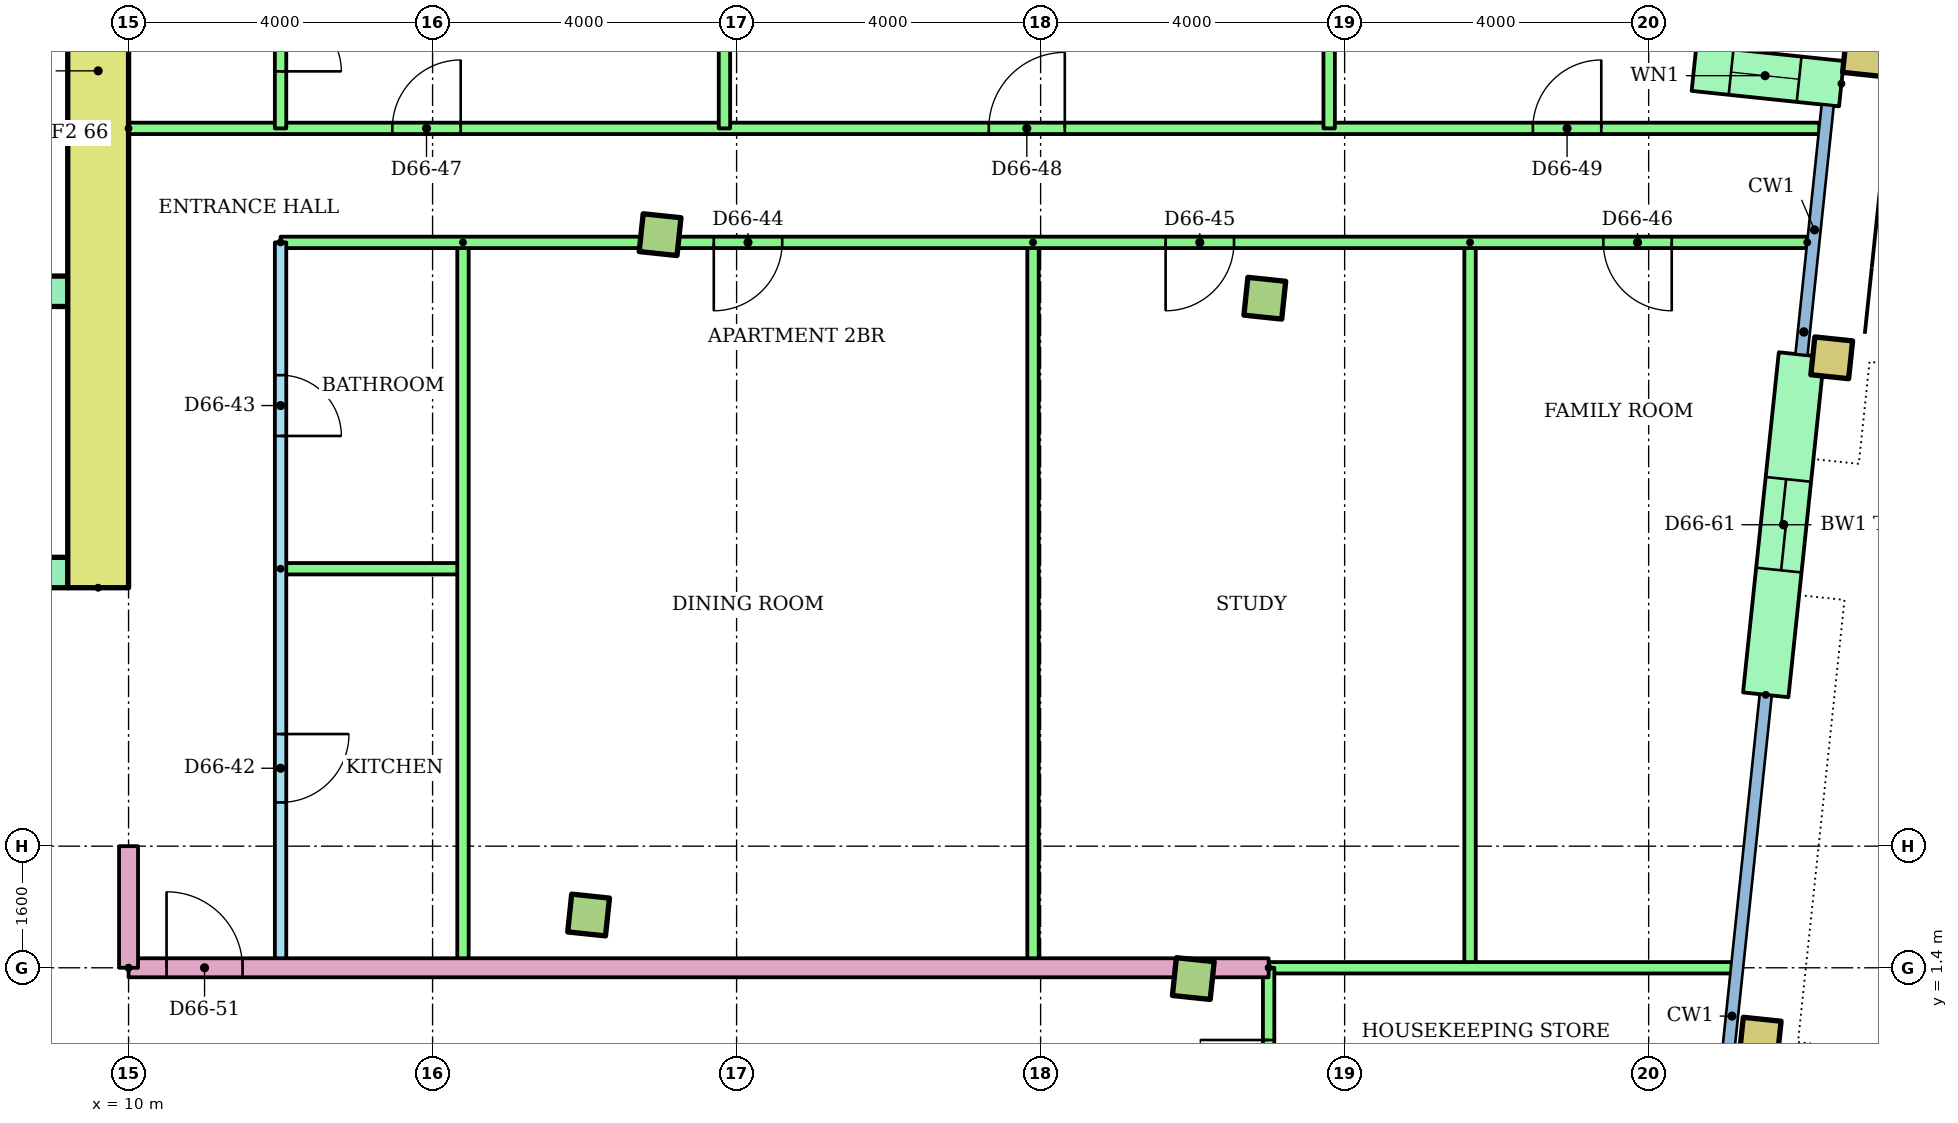
"""IFC4 building model, lengths in metres.
Left out: names, types, materials, properties, quantities, classifications, styles, units other than length and angle.
Written with IfcOpenShell. Run it as: python <this file> out.ifc"""

import sys

from ifc_helpers import new_model, si_unit, direction, frame, frame_2d, origin, origin_2d, place, context, subcontext, project, spatial, rectangle, hollow_rectangle, extrude, element, fill, save


model = new_model("IFC4")
c1 = context("Model", 3, precision=1e-05, world=origin(), true_north=direction((0.0, 1.0)))
c2 = subcontext(c1, "Body", "Model", "MODEL_VIEW")
j1 = project(units=[si_unit("LENGTHUNIT", "METRE"), si_unit("PLANEANGLEUNIT", "RADIAN")], contexts=[c1])
p1 = place(None, origin())
s1 = spatial("IfcSite", under=j1, at=p1, CompositionType="ELEMENT")
p2 = place(p1, origin())
s2 = spatial("IfcBuilding", under=s1, at=p2, CompositionType="ELEMENT")
p3 = place(p2, frame((0.0, 0.0, 256.3)))
s3 = spatial("IfcBuildingStorey", under=s2, at=p3, CompositionType="ELEMENT", Elevation=256.3)
for number, where, z_axis, x_axis in (
    (1, (16.053, 2.094, 0.0), (0.0, 0.0, 1.0), (0.995, -0.105, 0.0)),
    (2, (24.009, 1.258, 0.0), (0.0, 0.0, 1.0), (0.995, -0.105, 0.0)),
):
    element("IfcColumn", number, at=place(p3, frame(where, z_axis=z_axis, x_axis=x_axis)), inside=s3, PredefinedType="COLUMN", context=c2, shape_type="SweptSolid", body=[
        extrude(rectangle(XDim=0.5, YDim=0.5, at=origin_2d()), origin(), (0.0, 0.0, 1.0), 3.2),
    ])
p4 = place(p3, frame((31.468, 0.474, 0.0), z_axis=(0.0, 0.0, 1.0), x_axis=(0.994521895368, -0.104528463268, 0.0)))
e3 = element("IfcColumn", 3, at=p4, inside=s3, PredefinedType="COLUMN", context=c2, shape_type="SweptSolid", body=[
    extrude(hollow_rectangle(XDim=0.5, YDim=0.5, WallThickness=0.025, at=origin_2d()), origin(), (0.0, 0.0, 1.0), 3.2),
])
for number, where, z_axis, x_axis in (
    (4, (16.993, 11.045, 0.0), (0.0, 0.0, 1.0), (0.995, -0.105, 0.0)),
    (5, (24.95, 10.209, 0.0), (0.0, 0.0, 1.0), (0.995, -0.105, 0.0)),
):
    element("IfcColumn", number, at=place(p3, frame(where, z_axis=z_axis, x_axis=x_axis)), inside=s3, PredefinedType="COLUMN", context=c2, shape_type="SweptSolid", body=[
        extrude(rectangle(XDim=0.5, YDim=0.5, at=origin_2d()), origin(), (0.0, 0.0, 1.0), 3.2),
    ])
for number, where, z_axis, x_axis in (
    (6, (32.409, 9.425, 0.0), (0.0, 0.0, 1.0), (0.995, -0.105, 0.0)),
    (7, (32.827, 13.403, 0.0), (0.0, 0.0, 1.0), (0.995, -0.105, 0.0)),
):
    element("IfcColumn", number, at=place(p3, frame(where, z_axis=z_axis, x_axis=x_axis)), inside=s3, PredefinedType="COLUMN", context=c2, shape_type="SweptSolid", body=[
        extrude(hollow_rectangle(XDim=0.5, YDim=0.5, WallThickness=0.025, at=origin_2d()), origin(), (0.0, 0.0, 1.0), 3.2),
    ])
p5 = place(p3, frame((32.536, 13.031, 0.0), z_axis=(0.0, 0.0, 1.0), x_axis=(-0.994534226826, 0.104411070641, 0.0)))
e8 = element("IfcWall", 8, at=p5, inside=s3, PredefinedType="STANDARD", context=c2, shape_type="SweptSolid", body=[
    extrude(rectangle(XDim=1.95, YDim=0.6, at=frame_2d((0.975, 0.0))), origin(), (0.0, 0.0, 1.0), 2.92),
])
p6 = place(p5, frame((0.56, 0.0, 0.9)))
e9 = element("IfcOpeningElement", 9, at=p6, cuts=e8, PredefinedType="OPENING", context=c2, shape_type="SweptSolid", body=[
    extrude(rectangle(XDim=0.9, YDim=1.5, at=frame_2d((0.45, 0.75))), frame((0.0, 0.31, 0.0), z_axis=(0.0, -1.0, 0.0), x_axis=(1.0, 0.0, 0.0)), (0.0, 0.0, 1.0), 0.62),
])
p7 = place(p3, frame((31.54, 4.991, 0.0), z_axis=(0.0, 0.0, 1.0), x_axis=(0.104546400045, 0.994520009974, 0.0)))
e10 = element("IfcWall", 10, at=p7, inside=s3, PredefinedType="STANDARD", context=c2, shape_type="SweptSolid", body=[
    extrude(rectangle(XDim=4.5, YDim=0.6, at=frame_2d((2.25, 0.0))), origin(), (0.0, 0.0, 1.0), 2.92),
])
p8 = place(p7, frame((1.65, 0.0, 0.0)))
e11 = element("IfcOpeningElement", 11, at=p8, cuts=e10, PredefinedType="OPENING", context=c2, shape_type="SweptSolid", body=[
    extrude(rectangle(XDim=1.2, YDim=2.1, at=frame_2d((0.6, 1.05))), frame((0.0, 0.31, 0.0), z_axis=(0.0, -1.0, 0.0), x_axis=(1.0, 0.0, 0.0)), (0.0, 0.0, 1.0), 0.62),
])
p9 = place(p3, frame((9.6, 6.4, 0.0), z_axis=(0.0, 0.0, 1.0), x_axis=(0.0, 1.0, 0.0)))
e12 = element("IfcWall", 12, at=p9, inside=s3, PredefinedType="SHEAR", context=c2, shape_type="SweptSolid", body=[
    extrude(rectangle(XDim=13.6, YDim=0.8, at=frame_2d((6.8, 0.0))), origin(), (0.0, 0.0, 1.0), 2.92),
])
p10 = place(p3, frame((-9.2, 6.6, 0.0)))
e13 = element("IfcWall", 13, at=p10, inside=s3, PredefinedType="SHEAR", context=c2, shape_type="SweptSolid", body=[
    extrude(rectangle(XDim=18.4, YDim=0.4, at=frame_2d((9.2, 0.0))), origin(), (0.0, 0.0, 1.0), 2.92),
])
p11 = place(p10, frame((8.3, 0.0, 0.0)))
e14 = element("IfcOpeningElement", 14, at=p11, cuts=e13, PredefinedType="OPENING", context=c2, shape_type="SweptSolid", body=[
    extrude(rectangle(XDim=1.8, YDim=2.1, at=frame_2d((0.9, 1.05))), frame((0.0, 0.21, 0.0), z_axis=(0.0, -1.0, 0.0), x_axis=(1.0, 0.0, 0.0)), (0.0, 0.0, 1.0), 0.42),
])
p12 = place(p10, frame((3.8, 0.0, 0.0)))
e15 = element("IfcOpeningElement", 15, at=p12, cuts=e13, PredefinedType="OPENING", context=c2, shape_type="SweptSolid", body=[
    extrude(rectangle(XDim=1.8, YDim=2.1, at=frame_2d((0.9, 1.05))), frame((0.0, 0.21, 0.0), z_axis=(0.0, -1.0, 0.0), x_axis=(1.0, 0.0, 0.0)), (0.0, 0.0, 1.0), 0.42),
])
p13 = place(p10, frame((12.8, 0.0, 0.0)))
e16 = element("IfcOpeningElement", 16, at=p13, cuts=e13, PredefinedType="OPENING", context=c2, shape_type="SweptSolid", body=[
    extrude(rectangle(XDim=1.8, YDim=2.1, at=frame_2d((0.9, 1.05))), frame((0.0, 0.21, 0.0), z_axis=(0.0, -1.0, 0.0), x_axis=(1.0, 0.0, 0.0)), (0.0, 0.0, 1.0), 0.42),
])
p14 = place(p3, frame((1.2, 10.3, 0.0)))
e17 = element("IfcWall", 17, at=p14, inside=s3, PredefinedType="SHEAR", context=c2, shape_type="SweptSolid", body=[
    extrude(rectangle(XDim=8.0, YDim=0.4, at=frame_2d((4.0, 0.0))), origin(), (0.0, 0.0, 1.0), 2.92),
])
p15 = place(p14, frame((0.817, 0.0, 0.0)))
e18 = element("IfcOpeningElement", 18, at=p15, cuts=e17, PredefinedType="OPENING", context=c2, shape_type="SweptSolid", body=[
    extrude(rectangle(XDim=1.1, YDim=2.1, at=frame_2d((0.55, 1.05))), frame((0.0, 0.21, 0.0), z_axis=(0.0, -1.0, 0.0), x_axis=(1.0, 0.0, 0.0)), (0.0, 0.0, 1.0), 0.42),
])
p16 = place(p14, frame((3.55, 0.0, 0.0)))
e19 = element("IfcOpeningElement", 19, at=p16, cuts=e17, PredefinedType="OPENING", context=c2, shape_type="SweptSolid", body=[
    extrude(rectangle(XDim=1.1, YDim=2.1, at=frame_2d((0.55, 1.05))), frame((0.0, 0.21, 0.0), z_axis=(0.0, -1.0, 0.0), x_axis=(1.0, 0.0, 0.0)), (0.0, 0.0, 1.0), 0.42),
])
p17 = place(p14, frame((6.283, 0.0, 0.0)))
e20 = element("IfcOpeningElement", 20, at=p17, cuts=e17, PredefinedType="OPENING", context=c2, shape_type="SweptSolid", body=[
    extrude(rectangle(XDim=1.1, YDim=2.1, at=frame_2d((0.55, 1.05))), frame((0.0, 0.21, 0.0), z_axis=(0.0, -1.0, 0.0), x_axis=(1.0, 0.0, 0.0)), (0.0, 0.0, 1.0), 0.42),
])
p18 = place(p3, frame((12.0, 10.943, 0.0), z_axis=(0.0, 0.0, 1.0), x_axis=(0.0, -1.0, 0.0)))
e21 = element("IfcWall", 21, at=p18, inside=s3, PredefinedType="PARTITIONING", context=c2, shape_type="SweptSolid", body=[
    extrude(rectangle(XDim=9.543, YDim=0.15, at=frame_2d((4.772, 0.0))), origin(), (0.0, 0.0, 1.0), 2.4),
])
p19 = place(p18, frame((6.469, 0.0, 0.0)))
e22 = element("IfcOpeningElement", 22, at=p19, cuts=e21, PredefinedType="OPENING", context=c2, shape_type="SweptSolid", body=[
    extrude(rectangle(XDim=0.9, YDim=2.1, at=frame_2d((0.45, 1.05))), frame((0.0, 0.085, 0.0), z_axis=(0.0, -1.0, 0.0), x_axis=(1.0, 0.0, 0.0)), (0.0, 0.0, 1.0), 0.17),
])
p20 = place(p18, frame((1.747, 0.0, 0.0)))
e23 = element("IfcOpeningElement", 23, at=p20, cuts=e21, PredefinedType="OPENING", context=c2, shape_type="SweptSolid", body=[
    extrude(rectangle(XDim=0.8, YDim=2.1, at=frame_2d((0.4, 1.05))), frame((0.0, 0.085, 0.0), z_axis=(0.0, -1.0, 0.0), x_axis=(1.0, 0.0, 0.0)), (0.0, 0.0, 1.0), 0.17),
])
p21 = place(p3, frame((12.0, 6.65, 0.0)))
e24 = element("IfcWall", 24, at=p21, inside=s3, PredefinedType="PARTITIONING", context=c2, shape_type="SweptSolid", body=[
    extrude(rectangle(XDim=2.4, YDim=0.15, at=frame_2d((1.2, 0.0))), origin(), (0.0, 0.0, 1.0), 2.4),
])
for number, where, z_axis, x_axis in (
    (25, (14.4, 10.943, 0.0), (0.0, 0.0, 1.0), (0.0, -1.0, 0.0)),
    (26, (21.9, 10.943, 0.0), (0.0, 0.0, 1.0), (0.0, -1.0, 0.0)),
    (27, (27.65, 10.943, 0.0), (0.0, 0.0, 1.0), (0.0, -1.0, 0.0)),
):
    element("IfcWall", number, at=place(p3, frame(where, z_axis=z_axis, x_axis=x_axis)), inside=s3, PredefinedType="PARTITIONING", context=c2, shape_type="SweptSolid", body=[
        extrude(rectangle(XDim=9.543, YDim=0.15, at=frame_2d((4.772, 0.0))), origin(), (0.0, 0.0, 1.0), 2.4),
    ])
p22 = place(p3, frame((32.087, 10.943, 0.0), z_axis=(0.0, 0.0, 1.0), x_axis=(-1.0, 0.0, 0.0)))
e28 = element("IfcWall", 28, at=p22, inside=s3, PredefinedType="PARTITIONING", context=c2, shape_type="SweptSolid", body=[
    extrude(rectangle(XDim=20.087, YDim=0.15, at=frame_2d((10.043, 0.0))), origin(), (0.0, 0.0, 1.0), 2.4),
])
p23 = place(p22, frame((13.487, 0.0, 0.0)))
e29 = element("IfcOpeningElement", 29, at=p23, cuts=e28, PredefinedType="OPENING", context=c2, shape_type="SweptSolid", body=[
    extrude(rectangle(XDim=0.9, YDim=2.1, at=frame_2d((0.45, 1.05))), frame((0.0, 0.085, 0.0), z_axis=(0.0, -1.0, 0.0), x_axis=(1.0, 0.0, 0.0)), (0.0, 0.0, 1.0), 0.17),
])
p24 = place(p22, frame((7.542, 0.0, 0.0)))
e30 = element("IfcOpeningElement", 30, at=p24, cuts=e28, PredefinedType="OPENING", context=c2, shape_type="SweptSolid", body=[
    extrude(rectangle(XDim=0.9, YDim=2.1, at=frame_2d((0.45, 1.05))), frame((0.0, 0.085, 0.0), z_axis=(0.0, -1.0, 0.0), x_axis=(1.0, 0.0, 0.0)), (0.0, 0.0, 1.0), 0.17),
])
p25 = place(p22, frame((1.783, 0.0, 0.0)))
e31 = element("IfcOpeningElement", 31, at=p25, cuts=e28, PredefinedType="OPENING", context=c2, shape_type="SweptSolid", body=[
    extrude(rectangle(XDim=0.9, YDim=2.1, at=frame_2d((0.45, 1.05))), frame((0.0, 0.085, 0.0), z_axis=(0.0, -1.0, 0.0), x_axis=(1.0, 0.0, 0.0)), (0.0, 0.0, 1.0), 0.17),
])
p26 = place(p3, frame((10.0, 12.443, 0.0)))
e32 = element("IfcWall", 32, at=p26, inside=s3, PredefinedType="PARTITIONING", context=c2, shape_type="SweptSolid", body=[
    extrude(rectangle(XDim=22.244, YDim=0.15, at=frame_2d((11.122, 0.0))), origin(), (0.0, 0.0, 1.0), 2.4),
])
p27 = place(p26, frame((3.47, 0.0, 0.0)))
e33 = element("IfcOpeningElement", 33, at=p27, cuts=e32, PredefinedType="OPENING", context=c2, shape_type="SweptSolid", body=[
    extrude(rectangle(XDim=0.9, YDim=2.1, at=frame_2d((0.45, 1.05))), frame((0.0, 0.085, 0.0), z_axis=(0.0, -1.0, 0.0), x_axis=(1.0, 0.0, 0.0)), (0.0, 0.0, 1.0), 0.17),
])
p28 = place(p26, frame((11.318, 0.0, 0.0)))
e34 = element("IfcOpeningElement", 34, at=p28, cuts=e32, PredefinedType="OPENING", context=c2, shape_type="SweptSolid", body=[
    extrude(rectangle(XDim=1.0, YDim=2.1, at=frame_2d((0.5, 1.05))), frame((0.0, 0.085, 0.0), z_axis=(0.0, -1.0, 0.0), x_axis=(1.0, 0.0, 0.0)), (0.0, 0.0, 1.0), 0.17),
])
p29 = place(p26, frame((18.477, 0.0, 0.0)))
e35 = element("IfcOpeningElement", 35, at=p29, cuts=e32, PredefinedType="OPENING", context=c2, shape_type="SweptSolid", body=[
    extrude(rectangle(XDim=0.9, YDim=2.1, at=frame_2d((0.45, 1.05))), frame((0.0, 0.085, 0.0), z_axis=(0.0, -1.0, 0.0), x_axis=(1.0, 0.0, 0.0)), (0.0, 0.0, 1.0), 0.17),
])
p30 = place(p3, frame((17.84, 19.021, 0.0), z_axis=(0.0, 0.0, 1.0), x_axis=(0.0, -1.0, 0.0)))
e36 = element("IfcWall", 36, at=p30, inside=s3, PredefinedType="PARTITIONING", context=c2, shape_type="SweptSolid", body=[
    extrude(rectangle(XDim=6.578, YDim=0.15, at=frame_2d((3.289, 0.0))), origin(), (0.0, 0.0, 1.0), 2.4),
])
p31 = place(p3, frame((25.796, 18.185, 0.0), z_axis=(0.0, 0.0, 1.0), x_axis=(0.0, -1.0, 0.0)))
e37 = element("IfcWall", 37, at=p31, inside=s3, PredefinedType="PARTITIONING", context=c2, shape_type="SweptSolid", body=[
    extrude(rectangle(XDim=5.741, YDim=0.15, at=frame_2d((2.871, 0.0))), origin(), (0.0, 0.0, 1.0), 2.4),
])
p32 = place(p3, frame((12.0, 14.743, 0.0), z_axis=(0.0, 0.0, 1.0), x_axis=(0.0, -1.0, 0.0)))
e38 = element("IfcWall", 38, at=p32, inside=s3, PredefinedType="PARTITIONING", context=c2, shape_type="SweptSolid", body=[
    extrude(rectangle(XDim=2.3, YDim=0.15, at=frame_2d((1.15, 0.0))), origin(), (0.0, 0.0, 1.0), 2.4),
])
p33 = place(p32, frame((0.75, 0.0, 0.0)))
e39 = element("IfcOpeningElement", 39, at=p33, cuts=e38, PredefinedType="OPENING", context=c2, shape_type="SweptSolid", body=[
    extrude(rectangle(XDim=0.8, YDim=2.1, at=frame_2d((0.4, 1.05))), frame((0.0, 0.085, 0.0), z_axis=(0.0, -1.0, 0.0), x_axis=(1.0, 0.0, 0.0)), (0.0, 0.0, 1.0), 0.17),
])
p34 = place(p3, frame((10.0, 1.4, 0.0)))
e40 = element("IfcWall", 40, at=p34, inside=s3, PredefinedType="PARTITIONING", context=c2, shape_type="SweptSolid", body=[
    extrude(rectangle(XDim=15.0, YDim=0.25, at=frame_2d((7.5, 0.0))), origin(), (0.0, 0.0, 1.0), 2.4),
])
p35 = place(p34, frame((0.5, 0.0, 0.0)))
e41 = element("IfcOpeningElement", 41, at=p35, cuts=e40, PredefinedType="OPENING", context=c2, shape_type="SweptSolid", body=[
    extrude(rectangle(XDim=1.0, YDim=2.1, at=frame_2d((0.5, 1.05))), frame((0.0, 0.135, 0.0), z_axis=(0.0, -1.0, 0.0), x_axis=(1.0, 0.0, 0.0)), (0.0, 0.0, 1.0), 0.27),
])
p36 = place(p3, frame((25.0, 1.4, 0.0)))
e42 = element("IfcWall", 42, at=p36, inside=s3, PredefinedType="PARTITIONING", context=c2, shape_type="SweptSolid", body=[
    extrude(rectangle(XDim=6.093, YDim=0.15, at=frame_2d((3.046, 0.0))), origin(), (0.0, 0.0, 1.0), 2.4),
])
p37 = place(p3, frame((25.0, -1.4, 0.0), z_axis=(0.0, 0.0, 1.0), x_axis=(0.0, 1.0, 0.0)))
e43 = element("IfcWall", 43, at=p37, inside=s3, PredefinedType="PARTITIONING", context=c2, shape_type="SweptSolid", body=[
    extrude(rectangle(XDim=2.8, YDim=0.15, at=frame_2d((1.4, 0.0))), origin(), (0.0, 0.0, 1.0), 2.4),
])
p38 = place(p37, frame((0.95, 0.0, 0.0)))
e44 = element("IfcOpeningElement", 44, at=p38, cuts=e43, PredefinedType="OPENING", context=c2, shape_type="SweptSolid", body=[
    extrude(rectangle(XDim=0.9, YDim=2.1, at=frame_2d((0.45, 1.05))), frame((0.0, 0.085, 0.0), z_axis=(0.0, -1.0, 0.0), x_axis=(1.0, 0.0, 0.0)), (0.0, 0.0, 1.0), 0.17),
])
p39 = place(p3, frame((10.0, 1.4, 0.0), z_axis=(0.0, 0.0, 1.0), x_axis=(0.0, 1.0, 0.0)))
e45 = element("IfcWall", 45, at=p39, inside=s3, PredefinedType="PARTITIONING", context=c2, shape_type="SweptSolid", body=[
    extrude(rectangle(XDim=1.6, YDim=0.25, at=frame_2d((0.8, 0.0))), origin(), (0.0, 0.0, 1.0), 2.4),
])
p40 = place(p6, origin())
e46 = element("IfcWindow", 46, at=p40, inside=s3, PartitioningType="SINGLE_PANEL", PredefinedType="WINDOW", context=c2, shape_type="SweptSolid", body=[
    extrude(rectangle(XDim=0.9, YDim=1.5, at=frame_2d((0.45, 0.75))), frame((0.0, 0.03, 0.0), z_axis=(0.0, -1.0, 0.0), x_axis=(1.0, 0.0, 0.0)), (0.0, 0.0, 1.0), 0.06),
])
fill(e9, e46)
p41 = place(p19, origin())
e47 = element("IfcDoor", 47, at=p41, inside=s3, OperationType="SINGLE_SWING_LEFT", PredefinedType="DOOR", context=c2, shape_type="SweptSolid", body=[
    extrude(rectangle(XDim=0.9, YDim=2.1, at=frame_2d((0.45, 1.05))), frame((0.0, 0.025, 0.0), z_axis=(0.0, -1.0, 0.0), x_axis=(1.0, 0.0, 0.0)), (0.0, 0.0, 1.0), 0.05),
])
fill(e22, e47)
p42 = place(p20, origin())
e48 = element("IfcDoor", 48, at=p42, inside=s3, OperationType="SINGLE_SWING_RIGHT", PredefinedType="DOOR", context=c2, shape_type="SweptSolid", body=[
    extrude(rectangle(XDim=0.8, YDim=2.1, at=frame_2d((0.4, 1.05))), frame((0.0, 0.025, 0.0), z_axis=(0.0, -1.0, 0.0), x_axis=(1.0, 0.0, 0.0)), (0.0, 0.0, 1.0), 0.05),
])
fill(e23, e48)
p43 = place(p23, origin())
e49 = element("IfcDoor", 49, at=p43, inside=s3, OperationType="SINGLE_SWING_RIGHT", PredefinedType="DOOR", context=c2, shape_type="SweptSolid", body=[
    extrude(rectangle(XDim=0.9, YDim=2.1, at=frame_2d((0.45, 1.05))), frame((0.0, 0.025, 0.0), z_axis=(0.0, -1.0, 0.0), x_axis=(1.0, 0.0, 0.0)), (0.0, 0.0, 1.0), 0.05),
])
fill(e29, e49)
p44 = place(p24, origin())
e50 = element("IfcDoor", 50, at=p44, inside=s3, OperationType="SINGLE_SWING_RIGHT", PredefinedType="DOOR", context=c2, shape_type="SweptSolid", body=[
    extrude(rectangle(XDim=0.9, YDim=2.1, at=frame_2d((0.45, 1.05))), frame((0.0, 0.025, 0.0), z_axis=(0.0, -1.0, 0.0), x_axis=(1.0, 0.0, 0.0)), (0.0, 0.0, 1.0), 0.05),
])
fill(e30, e50)
p45 = place(p25, origin())
e51 = element("IfcDoor", 51, at=p45, inside=s3, OperationType="SINGLE_SWING_LEFT", PredefinedType="DOOR", context=c2, shape_type="SweptSolid", body=[
    extrude(rectangle(XDim=0.9, YDim=2.1, at=frame_2d((0.45, 1.05))), frame((0.0, 0.025, 0.0), z_axis=(0.0, -1.0, 0.0), x_axis=(1.0, 0.0, 0.0)), (0.0, 0.0, 1.0), 0.05),
])
fill(e31, e51)
p46 = place(p27, origin())
e52 = element("IfcDoor", 52, at=p46, inside=s3, OperationType="SINGLE_SWING_RIGHT", PredefinedType="DOOR", context=c2, shape_type="SweptSolid", body=[
    extrude(rectangle(XDim=0.9, YDim=2.1, at=frame_2d((0.45, 1.05))), frame((0.0, 0.025, 0.0), z_axis=(0.0, -1.0, 0.0), x_axis=(1.0, 0.0, 0.0)), (0.0, 0.0, 1.0), 0.05),
])
fill(e33, e52)
p47 = place(p28, origin())
e53 = element("IfcDoor", 53, at=p47, inside=s3, OperationType="SINGLE_SWING_RIGHT", PredefinedType="DOOR", context=c2, shape_type="SweptSolid", body=[
    extrude(rectangle(XDim=1.0, YDim=2.1, at=frame_2d((0.5, 1.05))), frame((0.0, 0.025, 0.0), z_axis=(0.0, -1.0, 0.0), x_axis=(1.0, 0.0, 0.0)), (0.0, 0.0, 1.0), 0.05),
])
fill(e34, e53)
p48 = place(p29, origin())
e54 = element("IfcDoor", 54, at=p48, inside=s3, OperationType="SINGLE_SWING_RIGHT", PredefinedType="DOOR", context=c2, shape_type="SweptSolid", body=[
    extrude(rectangle(XDim=0.9, YDim=2.1, at=frame_2d((0.45, 1.05))), frame((0.0, 0.025, 0.0), z_axis=(0.0, -1.0, 0.0), x_axis=(1.0, 0.0, 0.0)), (0.0, 0.0, 1.0), 0.05),
])
fill(e35, e54)
p49 = place(p33, origin())
e55 = element("IfcDoor", 55, at=p49, inside=s3, OperationType="SINGLE_SWING_RIGHT", PredefinedType="DOOR", context=c2, shape_type="SweptSolid", body=[
    extrude(rectangle(XDim=0.8, YDim=2.1, at=frame_2d((0.4, 1.05))), frame((0.0, 0.025, 0.0), z_axis=(0.0, -1.0, 0.0), x_axis=(1.0, 0.0, 0.0)), (0.0, 0.0, 1.0), 0.05),
])
fill(e39, e55)
p50 = place(p35, origin())
e56 = element("IfcDoor", 56, at=p50, inside=s3, OperationType="SINGLE_SWING_LEFT", PredefinedType="DOOR", context=c2, shape_type="SweptSolid", body=[
    extrude(rectangle(XDim=1.0, YDim=2.1, at=frame_2d((0.5, 1.05))), frame((0.0, 0.025, 0.0), z_axis=(0.0, -1.0, 0.0), x_axis=(1.0, 0.0, 0.0)), (0.0, 0.0, 1.0), 0.05),
])
fill(e41, e56)
p51 = place(p38, origin())
e57 = element("IfcDoor", 57, at=p51, inside=s3, OperationType="SINGLE_SWING_RIGHT", PredefinedType="DOOR", context=c2, shape_type="SweptSolid", body=[
    extrude(rectangle(XDim=0.9, YDim=2.1, at=frame_2d((0.45, 1.05))), frame((0.0, 0.025, 0.0), z_axis=(0.0, -1.0, 0.0), x_axis=(1.0, 0.0, 0.0)), (0.0, 0.0, 1.0), 0.05),
])
fill(e44, e57)
p52 = place(p8, origin())
e58 = element("IfcDoor", 58, at=p52, inside=s3, OperationType="SLIDING_TO_LEFT", PredefinedType="DOOR", context=c2, shape_type="SweptSolid", body=[
    extrude(rectangle(XDim=1.2, YDim=2.1, at=frame_2d((0.6, 1.05))), frame((0.0, 0.025, 0.0), z_axis=(0.0, -1.0, 0.0), x_axis=(1.0, 0.0, 0.0)), (0.0, 0.0, 1.0), 0.05),
])
fill(e11, e58)
save(model, sys.argv[1])
